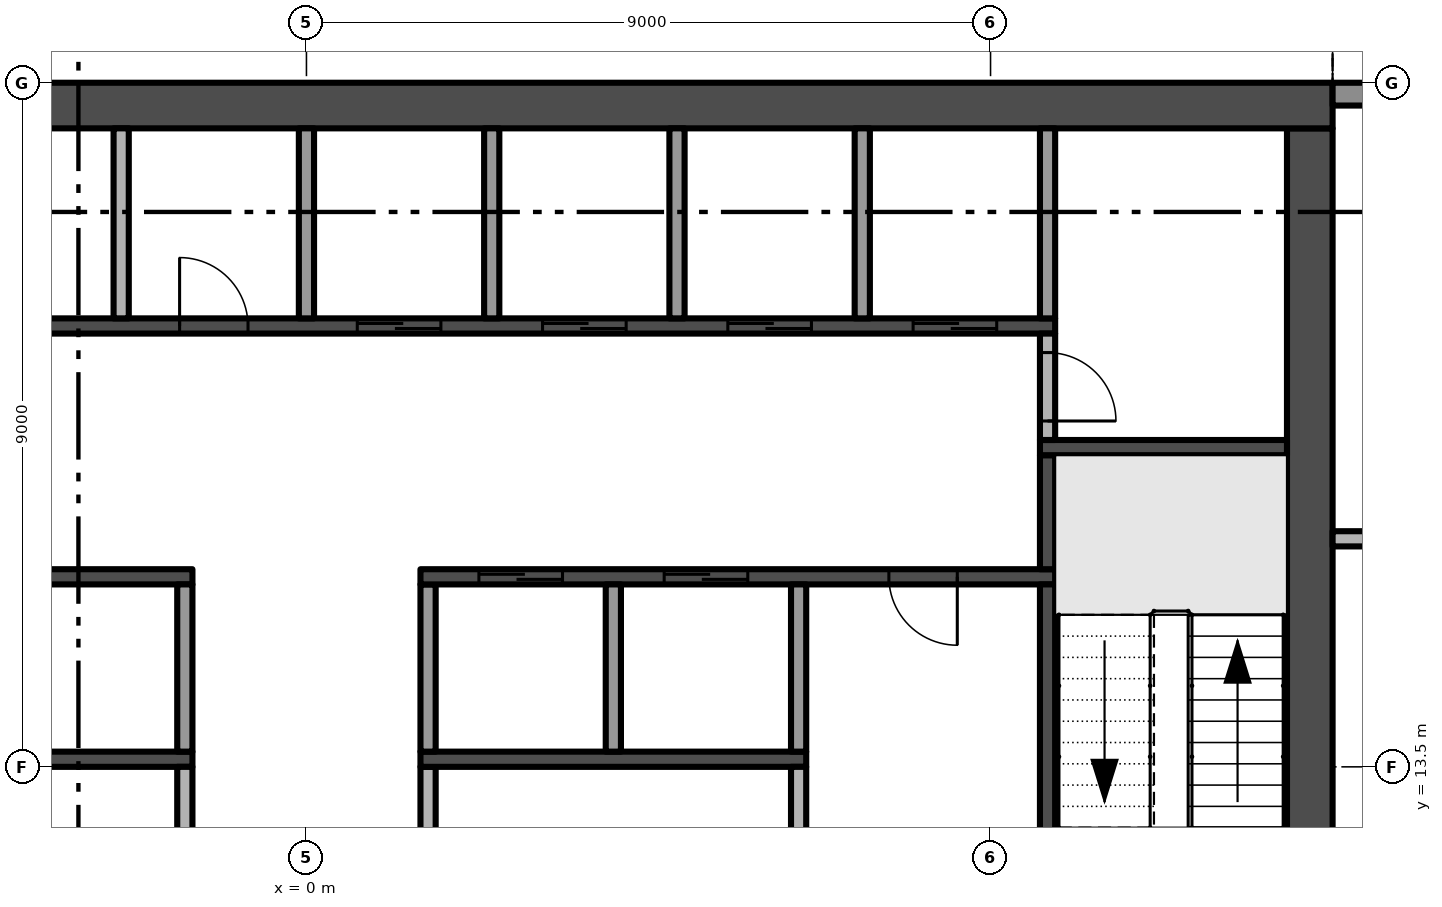
"""IFC4 building model, lengths in metres.
Left out: names, types, materials, properties, quantities, classifications, styles, units other than length and angle.
Written with IfcOpenShell. Run it as: python <this file> out.ifc"""

import sys

from ifc_helpers import new_model, si_unit, direction, frame, frame_2d, origin, place, context, subcontext, project, spatial, polyline, rectangle, outline, extrude, element, fill, save


model = new_model("IFC4")
c1 = context("Model", 3, precision=1e-05, world=origin(), true_north=direction((0.0, 1.0)))
c2 = subcontext(c1, "Body", "Model", "MODEL_VIEW")
j1 = project(units=[si_unit("LENGTHUNIT", "METRE"), si_unit("PLANEANGLEUNIT", "RADIAN")], contexts=[c1])
p1 = place(None, origin())
s1 = spatial("IfcSite", under=j1, at=p1, CompositionType="ELEMENT")
p2 = place(p1, origin())
s2 = spatial("IfcBuilding", under=s1, at=p2, CompositionType="ELEMENT")
p3 = place(p2, frame((0.0, 0.0, 218.6)))
s3 = spatial("IfcBuildingStorey", under=s2, at=p3, CompositionType="ELEMENT", Elevation=218.6)
p4 = place(p3, frame((13.2, 5.1, -0.3), z_axis=(0.0, 0.0, 1.0), x_axis=(0.0, 1.0, 0.0)))
e1 = element("IfcWall", 1, at=p4, inside=s3, PredefinedType="SHEAR", context=c2, shape_type="SweptSolid", body=[
    extrude(rectangle(XDim=16.8, YDim=0.6, at=frame_2d((8.4, 0.0))), origin(), (0.0, 0.0, 1.0), 3.8),
])
p5 = place(p4, frame((6.3, 0.0, 0.3)))
e2 = element("IfcOpeningElement", 2, at=p5, cuts=e1, PredefinedType="OPENING", context=c2, shape_type="SweptSolid", body=[
    extrude(rectangle(XDim=1.2, YDim=2.2, at=frame_2d((0.6, 1.1))), frame((0.0, 0.31, 0.0), z_axis=(0.0, -1.0, 0.0), x_axis=(1.0, 0.0, 0.0)), (0.0, 0.0, 1.0), 0.62),
])
p6 = place(p3, frame((13.5, 22.2, -0.3), z_axis=(0.0, 0.0, 1.0), x_axis=(-1.0, 0.0, 0.0)))
e3 = element("IfcWall", 3, at=p6, inside=s3, PredefinedType="SHEAR", context=c2, shape_type="SweptSolid", body=[
    extrude(rectangle(XDim=27.0, YDim=0.6, at=frame_2d((13.5, 0.0))), origin(), (0.0, 0.0, 1.0), 3.8),
])
p7 = place(p3, frame((13.5, 22.35, 0.0), z_axis=(0.0, 0.0, 1.0), x_axis=(1.0, 0.0, 0.0)))
e4 = element("IfcWall", 4, at=p7, inside=s3, PredefinedType="SOLIDWALL", context=c2, shape_type="SweptSolid", body=[
    extrude(rectangle(XDim=4.025, YDim=0.3, at=frame_2d((2.013, 0.0))), origin(), (0.0, 0.0, 1.0), 3.5),
])
p8 = place(p7, frame((0.625, 0.0, 0.45)))
e5 = element("IfcOpeningElement", 5, at=p8, cuts=e4, PredefinedType="OPENING", context=c2, shape_type="SweptSolid", body=[
    extrude(rectangle(XDim=3.075, YDim=2.65, at=frame_2d((1.538, 1.325))), frame((0.0, 0.16, 0.0), z_axis=(0.0, -1.0, 0.0), x_axis=(1.0, 0.0, 0.0)), (0.0, 0.0, 1.0), 0.32),
])
p9 = place(p3, origin())
e6 = element("IfcWall", 6, at=p9, inside=s3, PredefinedType="USERDEFINED", context=c2, shape_type="SweptSolid", body=[
    extrude(outline(polyline([(22.5, 25.5), (21.0, 25.271), (19.5, 24.671), (18.0, 23.929), (16.5, 23.329), (15.0, 23.1), (13.5, 23.329), (13.462, 23.082), (15.0, 22.847), (16.566, 23.086), (18.102, 23.701), (19.602, 24.442), (21.066, 25.028), (22.538, 25.253), (22.5, 25.5)])), origin(), (0.0, 0.0, 1.0), 0.9),
])
p10 = place(p3, frame((-1.5, 16.0, 0.0), z_axis=(0.0, 0.0, 1.0), x_axis=(-1.0, 0.0, 0.0)))
e7 = element("IfcWall", 7, at=p10, inside=s3, PredefinedType="SHEAR", context=c2, shape_type="SweptSolid", body=[
    extrude(rectangle(XDim=8.35, YDim=0.2, at=frame_2d((4.175, 0.0))), origin(), (0.0, 0.0, 1.0), 3.5),
])
p11 = place(p10, frame((6.162, 0.0, 0.0)))
e8 = element("IfcOpeningElement", 8, at=p11, cuts=e7, PredefinedType="OPENING", context=c2, shape_type="SweptSolid", body=[
    extrude(rectangle(XDim=0.9, YDim=2.1, at=frame_2d((0.45, 1.05))), frame((0.0, 0.11, 0.0), z_axis=(0.0, -1.0, 0.0), x_axis=(1.0, 0.0, 0.0)), (0.0, 0.0, 1.0), 0.22),
])
p12 = place(p3, frame((-9.85, 19.3, 0.0), z_axis=(0.0, 0.0, 1.0), x_axis=(1.0, 0.0, 0.0)))
e9 = element("IfcWall", 9, at=p12, inside=s3, PredefinedType="SHEAR", context=c2, shape_type="SweptSolid", body=[
    extrude(rectangle(XDim=19.7, YDim=0.2, at=frame_2d((9.85, 0.0))), origin(), (0.0, 0.0, 1.0), 3.5),
])
p13 = place(p12, frame((10.519, 0.0, 0.0)))
e10 = element("IfcOpeningElement", 10, at=p13, cuts=e9, PredefinedType="OPENING", context=c2, shape_type="SweptSolid", body=[
    extrude(rectangle(XDim=1.1, YDim=2.1, at=frame_2d((0.55, 1.05))), frame((0.0, 0.11, 0.0), z_axis=(0.0, -1.0, 0.0), x_axis=(1.0, 0.0, 0.0)), (0.0, 0.0, 1.0), 0.22),
])
p14 = place(p12, frame((12.956, 0.0, 0.0)))
e11 = element("IfcOpeningElement", 11, at=p14, cuts=e9, PredefinedType="OPENING", context=c2, shape_type="SweptSolid", body=[
    extrude(rectangle(XDim=1.1, YDim=2.1, at=frame_2d((0.55, 1.05))), frame((0.0, 0.11, 0.0), z_axis=(0.0, -1.0, 0.0), x_axis=(1.0, 0.0, 0.0)), (0.0, 0.0, 1.0), 0.22),
])
p15 = place(p12, frame((15.394, 0.0, 0.0)))
e12 = element("IfcOpeningElement", 12, at=p15, cuts=e9, PredefinedType="OPENING", context=c2, shape_type="SweptSolid", body=[
    extrude(rectangle(XDim=1.1, YDim=2.1, at=frame_2d((0.55, 1.05))), frame((0.0, 0.11, 0.0), z_axis=(0.0, -1.0, 0.0), x_axis=(1.0, 0.0, 0.0)), (0.0, 0.0, 1.0), 0.22),
])
p16 = place(p12, frame((17.831, 0.0, 0.0)))
e13 = element("IfcOpeningElement", 13, at=p16, cuts=e9, PredefinedType="OPENING", context=c2, shape_type="SweptSolid", body=[
    extrude(rectangle(XDim=1.1, YDim=2.1, at=frame_2d((0.55, 1.05))), frame((0.0, 0.11, 0.0), z_axis=(0.0, -1.0, 0.0), x_axis=(1.0, 0.0, 0.0)), (0.0, 0.0, 1.0), 0.22),
])
p17 = place(p12, frame((3.306, 0.0, 0.0)))
e14 = element("IfcOpeningElement", 14, at=p17, cuts=e9, PredefinedType="OPENING", context=c2, shape_type="SweptSolid", body=[
    extrude(rectangle(XDim=0.9, YDim=2.1, at=frame_2d((0.45, 1.05))), frame((0.0, 0.11, 0.0), z_axis=(0.0, -1.0, 0.0), x_axis=(1.0, 0.0, 0.0)), (0.0, 0.0, 1.0), 0.22),
])
p18 = place(p12, frame((8.181, 0.0, 0.0)))
e15 = element("IfcOpeningElement", 15, at=p18, cuts=e9, PredefinedType="OPENING", context=c2, shape_type="SweptSolid", body=[
    extrude(rectangle(XDim=0.9, YDim=2.1, at=frame_2d((0.45, 1.05))), frame((0.0, 0.11, 0.0), z_axis=(0.0, -1.0, 0.0), x_axis=(1.0, 0.0, 0.0)), (0.0, 0.0, 1.0), 0.22),
])
p19 = place(p3, frame((-6.575, 13.6, 0.0), z_axis=(0.0, 0.0, 1.0), x_axis=(1.0, 0.0, 0.0)))
e16 = element("IfcWall", 16, at=p19, inside=s3, PredefinedType="SHEAR", context=c2, shape_type="SweptSolid", body=[
    extrude(rectangle(XDim=5.075, YDim=0.2, at=frame_2d((2.538, 0.0))), origin(), (0.0, 0.0, 1.0), 3.5),
])
p20 = place(p3, frame((-2.438, 19.4, 0.0), z_axis=(0.0, 0.0, 1.0), x_axis=(0.0, 1.0, 0.0)))
e17 = element("IfcWall", 17, at=p20, inside=s3, PredefinedType="PARTITIONING", context=c2, shape_type="SweptSolid", body=[
    extrude(rectangle(XDim=2.5, YDim=0.2, at=frame_2d((1.25, 0.0))), origin(), (0.0, 0.0, 1.0), 3.5),
])
p21 = place(p3, frame((-1.6, 10.5, 0.0), z_axis=(0.0, 0.0, 1.0), x_axis=(0.0, 1.0, 0.0)))
e18 = element("IfcWall", 18, at=p21, inside=s3, PredefinedType="PARTITIONING", context=c2, shape_type="SweptSolid", body=[
    extrude(rectangle(XDim=3.0, YDim=0.2, at=frame_2d((1.5, 0.0))), origin(), (0.0, 0.0, 1.0), 3.5),
])
p22 = place(p21, frame((1.05, 0.0, 0.0)))
e19 = element("IfcOpeningElement", 19, at=p22, cuts=e18, PredefinedType="OPENING", context=c2, shape_type="SweptSolid", body=[
    extrude(rectangle(XDim=0.9, YDim=2.1, at=frame_2d((0.45, 1.05))), frame((0.0, 0.11, 0.0), z_axis=(0.0, -1.0, 0.0), x_axis=(1.0, 0.0, 0.0)), (0.0, 0.0, 1.0), 0.22),
])
p23 = place(p3, frame((-1.6, 13.7, 0.0), z_axis=(0.0, 0.0, 1.0), x_axis=(0.0, 1.0, 0.0)))
e20 = element("IfcWall", 20, at=p23, inside=s3, PredefinedType="PARTITIONING", context=c2, shape_type="SweptSolid", body=[
    extrude(rectangle(XDim=2.2, YDim=0.2, at=frame_2d((1.1, 0.0))), origin(), (0.0, 0.0, 1.0), 3.5),
])
p24 = place(p3, frame((0.0, 19.4, 0.0), z_axis=(0.0, 0.0, 1.0), x_axis=(0.0, 1.0, 0.0)))
e21 = element("IfcWall", 21, at=p24, inside=s3, PredefinedType="PARTITIONING", context=c2, shape_type="SweptSolid", body=[
    extrude(rectangle(XDim=2.5, YDim=0.2, at=frame_2d((1.25, 0.0))), origin(), (0.0, 0.0, 1.0), 3.5),
])
p25 = place(p3, frame((1.6, 13.5, 0.0), z_axis=(0.0, 0.0, 1.0), x_axis=(0.0, -1.0, 0.0)))
e22 = element("IfcWall", 22, at=p25, inside=s3, PredefinedType="PARTITIONING", context=c2, shape_type="SweptSolid", body=[
    extrude(rectangle(XDim=2.9, YDim=0.2, at=frame_2d((1.45, 0.0))), origin(), (0.0, 0.0, 1.0), 3.5),
])
p26 = place(p25, frame((1.0, 0.0, 0.0)))
e23 = element("IfcOpeningElement", 23, at=p26, cuts=e22, PredefinedType="OPENING", context=c2, shape_type="SweptSolid", body=[
    extrude(rectangle(XDim=0.9, YDim=2.1, at=frame_2d((0.45, 1.05))), frame((0.0, 0.11, 0.0), z_axis=(0.0, -1.0, 0.0), x_axis=(1.0, 0.0, 0.0)), (0.0, 0.0, 1.0), 0.22),
])
p27 = place(p3, frame((1.5, 13.6, 0.0), z_axis=(0.0, 0.0, 1.0), x_axis=(1.0, 0.0, 0.0)))
e24 = element("IfcWall", 24, at=p27, inside=s3, PredefinedType="SHEAR", context=c2, shape_type="SweptSolid", body=[
    extrude(rectangle(XDim=5.075, YDim=0.2, at=frame_2d((2.538, 0.0))), origin(), (0.0, 0.0, 1.0), 3.5),
])
p28 = place(p3, frame((1.6, 13.7, 0.0), z_axis=(0.0, 0.0, 1.0), x_axis=(0.0, 1.0, 0.0)))
e25 = element("IfcWall", 25, at=p28, inside=s3, PredefinedType="PARTITIONING", context=c2, shape_type="SweptSolid", body=[
    extrude(rectangle(XDim=2.2, YDim=0.2, at=frame_2d((1.1, 0.0))), origin(), (0.0, 0.0, 1.0), 3.5),
])
p29 = place(p3, frame((9.85, 16.0, 0.0), z_axis=(0.0, 0.0, 1.0), x_axis=(-1.0, 0.0, 0.0)))
e26 = element("IfcWall", 26, at=p29, inside=s3, PredefinedType="SHEAR", context=c2, shape_type="SweptSolid", body=[
    extrude(rectangle(XDim=8.35, YDim=0.2, at=frame_2d((4.175, 0.0))), origin(), (0.0, 0.0, 1.0), 3.5),
])
p30 = place(p29, frame((6.481, 0.0, 0.0)))
e27 = element("IfcOpeningElement", 27, at=p30, cuts=e26, PredefinedType="OPENING", context=c2, shape_type="SweptSolid", body=[
    extrude(rectangle(XDim=1.1, YDim=2.1, at=frame_2d((0.55, 1.05))), frame((0.0, 0.11, 0.0), z_axis=(0.0, -1.0, 0.0), x_axis=(1.0, 0.0, 0.0)), (0.0, 0.0, 1.0), 0.22),
])
p31 = place(p29, frame((4.044, 0.0, 0.0)))
e28 = element("IfcOpeningElement", 28, at=p31, cuts=e26, PredefinedType="OPENING", context=c2, shape_type="SweptSolid", body=[
    extrude(rectangle(XDim=1.1, YDim=2.1, at=frame_2d((0.55, 1.05))), frame((0.0, 0.11, 0.0), z_axis=(0.0, -1.0, 0.0), x_axis=(1.0, 0.0, 0.0)), (0.0, 0.0, 1.0), 0.22),
])
p32 = place(p29, frame((1.288, 0.0, 0.0)))
e29 = element("IfcOpeningElement", 29, at=p32, cuts=e26, PredefinedType="OPENING", context=c2, shape_type="SweptSolid", body=[
    extrude(rectangle(XDim=0.9, YDim=2.1, at=frame_2d((0.45, 1.05))), frame((0.0, 0.11, 0.0), z_axis=(0.0, -1.0, 0.0), x_axis=(1.0, 0.0, 0.0)), (0.0, 0.0, 1.0), 0.22),
])
p33 = place(p3, frame((2.438, 19.4, 0.0), z_axis=(0.0, 0.0, 1.0), x_axis=(0.0, 1.0, 0.0)))
e30 = element("IfcWall", 30, at=p33, inside=s3, PredefinedType="PARTITIONING", context=c2, shape_type="SweptSolid", body=[
    extrude(rectangle(XDim=2.5, YDim=0.2, at=frame_2d((1.25, 0.0))), origin(), (0.0, 0.0, 1.0), 3.5),
])
p34 = place(p3, frame((4.037, 13.7, 0.0), z_axis=(0.0, 0.0, 1.0), x_axis=(0.0, 1.0, 0.0)))
e31 = element("IfcWall", 31, at=p34, inside=s3, PredefinedType="PARTITIONING", context=c2, shape_type="SweptSolid", body=[
    extrude(rectangle(XDim=2.2, YDim=0.2, at=frame_2d((1.1, 0.0))), origin(), (0.0, 0.0, 1.0), 3.5),
])
p35 = place(p3, frame((4.875, 19.4, 0.0), z_axis=(0.0, 0.0, 1.0), x_axis=(0.0, 1.0, 0.0)))
e32 = element("IfcWall", 32, at=p35, inside=s3, PredefinedType="PARTITIONING", context=c2, shape_type="SweptSolid", body=[
    extrude(rectangle(XDim=2.5, YDim=0.2, at=frame_2d((1.25, 0.0))), origin(), (0.0, 0.0, 1.0), 3.5),
])
p36 = place(p3, frame((6.475, 12.3, 0.0), z_axis=(0.0, 0.0, 1.0), x_axis=(0.0, 1.0, 0.0)))
e33 = element("IfcWall", 33, at=p36, inside=s3, PredefinedType="PARTITIONING", context=c2, shape_type="SweptSolid", body=[
    extrude(rectangle(XDim=1.2, YDim=0.2, at=frame_2d((0.6, 0.0))), origin(), (0.0, 0.0, 1.0), 3.5),
])
p37 = place(p3, frame((6.475, 13.7, 0.0), z_axis=(0.0, 0.0, 1.0), x_axis=(0.0, 1.0, 0.0)))
e34 = element("IfcWall", 34, at=p37, inside=s3, PredefinedType="PARTITIONING", context=c2, shape_type="SweptSolid", body=[
    extrude(rectangle(XDim=2.2, YDim=0.2, at=frame_2d((1.1, 0.0))), origin(), (0.0, 0.0, 1.0), 3.5),
])
p38 = place(p3, frame((7.312, 19.4, 0.0), z_axis=(0.0, 0.0, 1.0), x_axis=(0.0, 1.0, 0.0)))
e35 = element("IfcWall", 35, at=p38, inside=s3, PredefinedType="PARTITIONING", context=c2, shape_type="SweptSolid", body=[
    extrude(rectangle(XDim=2.5, YDim=0.2, at=frame_2d((1.25, 0.0))), origin(), (0.0, 0.0, 1.0), 3.5),
])
p39 = place(p3, frame((9.75, 12.3, 0.0), z_axis=(0.0, 0.0, 1.0), x_axis=(0.0, 1.0, 0.0)))
e36 = element("IfcWall", 36, at=p39, inside=s3, PredefinedType="SHEAR", context=c2, shape_type="SweptSolid", body=[
    extrude(rectangle(XDim=3.6, YDim=0.2, at=frame_2d((1.8, 0.0))), origin(), (0.0, 0.0, 1.0), 3.5),
])
p40 = place(p3, frame((9.75, 16.1, 0.0), z_axis=(0.0, 0.0, 1.0), x_axis=(0.0, 1.0, 0.0)))
e37 = element("IfcWall", 37, at=p40, inside=s3, PredefinedType="SHEAR", context=c2, shape_type="SweptSolid", body=[
    extrude(rectangle(XDim=1.5, YDim=0.2, at=frame_2d((0.75, 0.0))), origin(), (0.0, 0.0, 1.0), 3.5),
])
p41 = place(p3, frame((9.65, 17.7, 0.0), z_axis=(0.0, 0.0, 1.0), x_axis=(1.0, 0.0, 0.0)))
e38 = element("IfcWall", 38, at=p41, inside=s3, PredefinedType="SHEAR", context=c2, shape_type="SweptSolid", body=[
    extrude(rectangle(XDim=3.25, YDim=0.2, at=frame_2d((1.625, 0.0))), origin(), (0.0, 0.0, 1.0), 3.5),
])
p42 = place(p3, frame((9.75, 19.2, 0.0), z_axis=(0.0, 0.0, 1.0), x_axis=(0.0, -1.0, 0.0)))
e39 = element("IfcWall", 39, at=p42, inside=s3, PredefinedType="PARTITIONING", context=c2, shape_type="SweptSolid", body=[
    extrude(rectangle(XDim=1.4, YDim=0.2, at=frame_2d((0.7, 0.0))), origin(), (0.0, 0.0, 1.0), 3.5),
])
p43 = place(p42, frame((0.25, 0.0, 0.0)))
e40 = element("IfcOpeningElement", 40, at=p43, cuts=e39, PredefinedType="OPENING", context=c2, shape_type="SweptSolid", body=[
    extrude(rectangle(XDim=0.9, YDim=2.1, at=frame_2d((0.45, 1.05))), frame((0.0, 0.11, 0.0), z_axis=(0.0, -1.0, 0.0), x_axis=(1.0, 0.0, 0.0)), (0.0, 0.0, 1.0), 0.22),
])
p44 = place(p3, frame((9.75, 19.4, 0.0), z_axis=(0.0, 0.0, 1.0), x_axis=(0.0, 1.0, 0.0)))
e41 = element("IfcWall", 41, at=p44, inside=s3, PredefinedType="PARTITIONING", context=c2, shape_type="SweptSolid", body=[
    extrude(rectangle(XDim=2.5, YDim=0.2, at=frame_2d((1.25, 0.0))), origin(), (0.0, 0.0, 1.0), 3.5),
])
p45 = place(p3, frame((13.5, 16.5, 0.0), z_axis=(0.0, 0.0, 1.0), x_axis=(1.0, 0.0, 0.0)))
e42 = element("IfcWall", 42, at=p45, inside=s3, PredefinedType="PARTITIONING", context=c2, shape_type="SweptSolid", body=[
    extrude(rectangle(XDim=3.825, YDim=0.2, at=frame_2d((1.913, 0.0))), origin(), (0.0, 0.0, 1.0), 3.5),
])
p46 = place(p45, frame((1.55, 0.0, 0.0)))
e43 = element("IfcOpeningElement", 43, at=p46, cuts=e42, PredefinedType="OPENING", context=c2, shape_type="SweptSolid", body=[
    extrude(rectangle(XDim=0.9, YDim=2.1, at=frame_2d((0.45, 1.05))), frame((0.0, 0.11, 0.0), z_axis=(0.0, -1.0, 0.0), x_axis=(1.0, 0.0, 0.0)), (0.0, 0.0, 1.0), 0.22),
])
p47 = place(p13, origin())
e44 = element("IfcDoor", 44, at=p47, inside=s3, OperationType="SLIDING_TO_RIGHT", PredefinedType="DOOR", context=c2, shape_type="SweptSolid", body=[
    extrude(rectangle(XDim=1.1, YDim=2.1, at=frame_2d((0.55, 1.05))), frame((0.0, 0.025, 0.0), z_axis=(0.0, -1.0, 0.0), x_axis=(1.0, 0.0, 0.0)), (0.0, 0.0, 1.0), 0.05),
])
fill(e10, e44)
p48 = place(p14, origin())
e45 = element("IfcDoor", 45, at=p48, inside=s3, OperationType="SLIDING_TO_RIGHT", PredefinedType="DOOR", context=c2, shape_type="SweptSolid", body=[
    extrude(rectangle(XDim=1.1, YDim=2.1, at=frame_2d((0.55, 1.05))), frame((0.0, 0.025, 0.0), z_axis=(0.0, -1.0, 0.0), x_axis=(1.0, 0.0, 0.0)), (0.0, 0.0, 1.0), 0.05),
])
fill(e11, e45)
p49 = place(p15, origin())
e46 = element("IfcDoor", 46, at=p49, inside=s3, OperationType="SLIDING_TO_RIGHT", PredefinedType="DOOR", context=c2, shape_type="SweptSolid", body=[
    extrude(rectangle(XDim=1.1, YDim=2.1, at=frame_2d((0.55, 1.05))), frame((0.0, 0.025, 0.0), z_axis=(0.0, -1.0, 0.0), x_axis=(1.0, 0.0, 0.0)), (0.0, 0.0, 1.0), 0.05),
])
fill(e12, e46)
p50 = place(p16, origin())
e47 = element("IfcDoor", 47, at=p50, inside=s3, OperationType="SLIDING_TO_RIGHT", PredefinedType="DOOR", context=c2, shape_type="SweptSolid", body=[
    extrude(rectangle(XDim=1.1, YDim=2.1, at=frame_2d((0.55, 1.05))), frame((0.0, 0.025, 0.0), z_axis=(0.0, -1.0, 0.0), x_axis=(1.0, 0.0, 0.0)), (0.0, 0.0, 1.0), 0.05),
])
fill(e13, e47)
p51 = place(p30, origin())
e48 = element("IfcDoor", 48, at=p51, inside=s3, OperationType="SLIDING_TO_RIGHT", PredefinedType="DOOR", context=c2, shape_type="SweptSolid", body=[
    extrude(rectangle(XDim=1.1, YDim=2.1, at=frame_2d((0.55, 1.05))), frame((0.0, 0.025, 0.0), z_axis=(0.0, -1.0, 0.0), x_axis=(1.0, 0.0, 0.0)), (0.0, 0.0, 1.0), 0.05),
])
fill(e27, e48)
p52 = place(p31, origin())
e49 = element("IfcDoor", 49, at=p52, inside=s3, OperationType="SLIDING_TO_RIGHT", PredefinedType="DOOR", context=c2, shape_type="SweptSolid", body=[
    extrude(rectangle(XDim=1.1, YDim=2.1, at=frame_2d((0.55, 1.05))), frame((0.0, 0.025, 0.0), z_axis=(0.0, -1.0, 0.0), x_axis=(1.0, 0.0, 0.0)), (0.0, 0.0, 1.0), 0.05),
])
fill(e28, e49)
p53 = place(p32, origin())
e50 = element("IfcDoor", 50, at=p53, inside=s3, OperationType="SINGLE_SWING_LEFT", PredefinedType="DOOR", context=c2, shape_type="SweptSolid", body=[
    extrude(rectangle(XDim=0.9, YDim=2.1, at=frame_2d((0.45, 1.05))), frame((0.0, 0.025, 0.0), z_axis=(0.0, -1.0, 0.0), x_axis=(1.0, 0.0, 0.0)), (0.0, 0.0, 1.0), 0.05),
])
fill(e29, e50)
p54 = place(p43, origin())
e51 = element("IfcDoor", 51, at=p54, inside=s3, OperationType="SINGLE_SWING_RIGHT", PredefinedType="DOOR", context=c2, shape_type="SweptSolid", body=[
    extrude(rectangle(XDim=0.9, YDim=2.1, at=frame_2d((0.45, 1.05))), frame((0.0, 0.025, 0.0), z_axis=(0.0, -1.0, 0.0), x_axis=(1.0, 0.0, 0.0)), (0.0, 0.0, 1.0), 0.05),
])
fill(e40, e51)
p55 = place(p18, origin())
e52 = element("IfcDoor", 52, at=p55, inside=s3, OperationType="SINGLE_SWING_LEFT", PredefinedType="DOOR", context=c2, shape_type="SweptSolid", body=[
    extrude(rectangle(XDim=0.9, YDim=2.1, at=frame_2d((0.45, 1.05))), frame((0.0, 0.025, 0.0), z_axis=(0.0, -1.0, 0.0), x_axis=(1.0, 0.0, 0.0)), (0.0, 0.0, 1.0), 0.05),
])
fill(e15, e52)
save(model, sys.argv[1])
